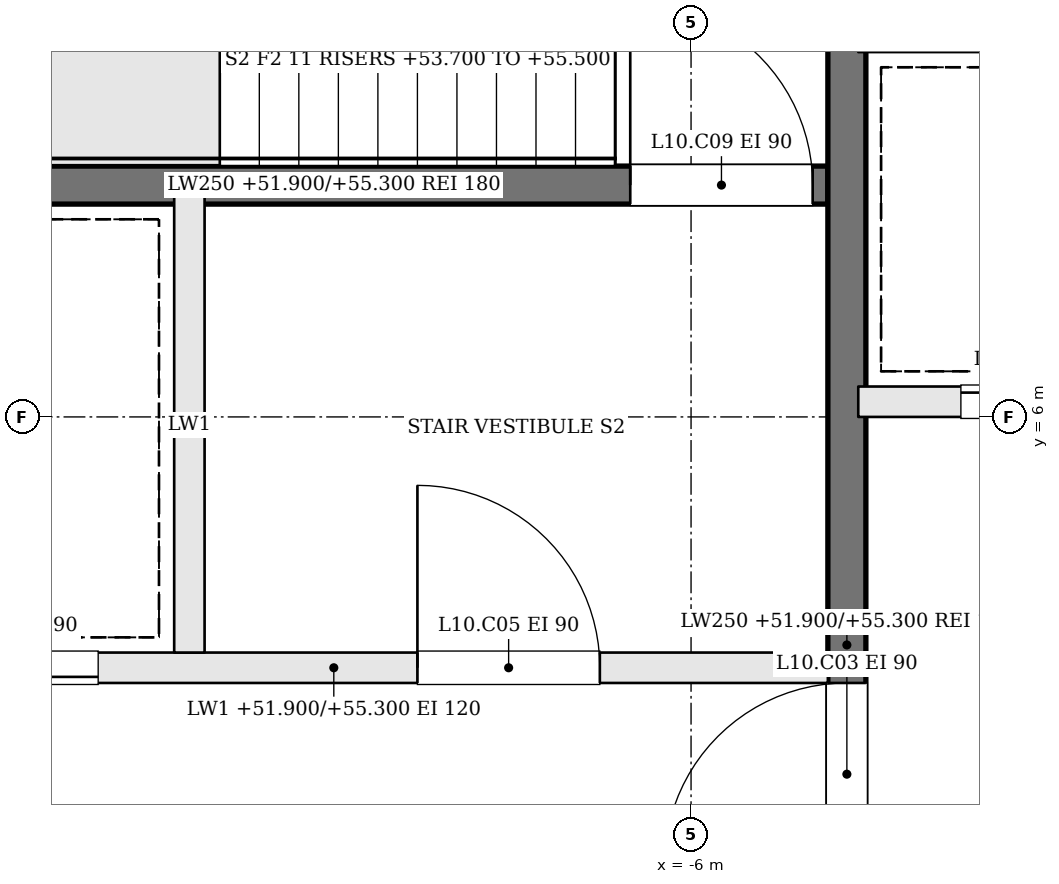
"""IFC4 building model, lengths in metres.
Left out: names, types, materials, properties, quantities, classifications, styles, units other than length and angle.
Written with IfcOpenShell. Run it as: python <this file> out.ifc"""

import sys

from ifc_helpers import new_model, si_unit, direction, frame, frame_2d, origin, place, context, subcontext, project, spatial, rectangle, extrude, element, fill, save


model = new_model("IFC4")
c1 = context("Model", 3, precision=1e-05, world=origin(), true_north=direction((0.0, 1.0)))
c2 = subcontext(c1, "Body", "Model", "MODEL_VIEW")
j1 = project(units=[si_unit("LENGTHUNIT", "METRE"), si_unit("PLANEANGLEUNIT", "RADIAN")], contexts=[c1])
p1 = place(None, origin())
s1 = spatial("IfcSite", under=j1, at=p1, CompositionType="ELEMENT")
p2 = place(p1, origin())
s2 = spatial("IfcBuilding", under=s1, at=p2, CompositionType="ELEMENT")
p3 = place(p2, frame((0.0, 0.0, 51.9)))
s3 = spatial("IfcBuildingStorey", under=s2, at=p3, CompositionType="ELEMENT", Elevation=51.9)
p4 = place(p3, frame((-11.6, 4.35, 0.0), z_axis=(0.0, 0.0, 1.0), x_axis=(1.0, 0.0, 0.0)))
e1 = element("IfcWall", 1, at=p4, inside=s3, PredefinedType="SOLIDWALL", context=c2, shape_type="SweptSolid", body=[
    extrude(rectangle(XDim=6.5, YDim=0.2, at=frame_2d((3.25, 0.0))), origin(), (0.0, 0.0, 1.0), 3.4),
])
p5 = place(p4, frame((3.8, 0.0, 0.0)))
e2 = element("IfcOpeningElement", 2, at=p5, cuts=e1, PredefinedType="OPENING", context=c2, shape_type="SweptSolid", body=[
    extrude(rectangle(XDim=1.2, YDim=2.1, at=frame_2d((0.6, 1.05))), frame((0.0, 0.11, 0.0), z_axis=(0.0, -1.0, 0.0), x_axis=(1.0, 0.0, 0.0)), (0.0, 0.0, 1.0), 0.22),
])
p6 = place(p4, frame((0.5, 0.0, 0.0)))
e3 = element("IfcOpeningElement", 3, at=p6, cuts=e1, PredefinedType="OPENING", context=c2, shape_type="SweptSolid", body=[
    extrude(rectangle(XDim=1.2, YDim=2.1, at=frame_2d((0.6, 1.05))), frame((0.0, 0.11, 0.0), z_axis=(0.0, -1.0, 0.0), x_axis=(1.0, 0.0, 0.0)), (0.0, 0.0, 1.0), 0.22),
])
p7 = place(p3, frame((-11.6, 7.525, 0.0), z_axis=(0.0, 0.0, 1.0), x_axis=(1.0, 0.0, 0.0)))
e4 = element("IfcWall", 4, at=p7, inside=s3, PredefinedType="SOLIDWALL", context=c2, shape_type="SweptSolid", body=[
    extrude(rectangle(XDim=6.5, YDim=0.25, at=frame_2d((3.25, 0.0))), origin(), (0.0, 0.0, 1.0), 3.4),
])
p8 = place(p7, frame((5.2, 0.0, 0.0)))
e5 = element("IfcOpeningElement", 5, at=p8, cuts=e4, PredefinedType="OPENING", context=c2, shape_type="SweptSolid", body=[
    extrude(rectangle(XDim=1.2, YDim=2.1, at=frame_2d((0.6, 1.05))), frame((0.0, 0.135, 0.0), z_axis=(0.0, -1.0, 0.0), x_axis=(1.0, 0.0, 0.0)), (0.0, 0.0, 1.0), 0.27),
])
p9 = place(p3, frame((-9.3, 4.45, 0.0), z_axis=(0.0, 0.0, 1.0), x_axis=(0.0, 1.0, 0.0)))
e6 = element("IfcWall", 6, at=p9, inside=s3, PredefinedType="SOLIDWALL", context=c2, shape_type="SweptSolid", body=[
    extrude(rectangle(XDim=3.0, YDim=0.2, at=frame_2d((1.5, 0.0))), origin(), (0.0, 0.0, 1.0), 3.4),
])
p10 = place(p3, frame((-4.975, -1.6, 0.0), z_axis=(0.0, 0.0, 1.0), x_axis=(0.0, 1.0, 0.0)))
e7 = element("IfcWall", 7, at=p10, inside=s3, PredefinedType="SOLIDWALL", context=c2, shape_type="SweptSolid", body=[
    extrude(rectangle(XDim=12.2, YDim=0.25, at=frame_2d((6.1, 0.0))), origin(), (0.0, 0.0, 1.0), 3.4),
])
p11 = place(p10, frame((4.65, 0.0, 0.0)))
e8 = element("IfcOpeningElement", 8, at=p11, cuts=e7, PredefinedType="OPENING", context=c2, shape_type="SweptSolid", body=[
    extrude(rectangle(XDim=1.2, YDim=2.1, at=frame_2d((0.6, 1.05))), frame((0.0, 0.135, 0.0), z_axis=(0.0, -1.0, 0.0), x_axis=(1.0, 0.0, 0.0)), (0.0, 0.0, 1.0), 0.27),
])
p12 = place(p3, frame((-4.9, 6.1, 0.0), z_axis=(0.0, 0.0, 1.0), x_axis=(1.0, 0.0, 0.0)))
e9 = element("IfcWall", 9, at=p12, inside=s3, PredefinedType="SOLIDWALL", context=c2, shape_type="SweptSolid", body=[
    extrude(rectangle(XDim=9.8, YDim=0.2, at=frame_2d((4.9, 0.0))), origin(), (0.0, 0.0, 1.0), 3.4),
])
p13 = place(p12, frame((0.675, 0.0, 0.0)))
e10 = element("IfcOpeningElement", 10, at=p13, cuts=e9, PredefinedType="OPENING", context=c2, shape_type="SweptSolid", body=[
    extrude(rectangle(XDim=1.1, YDim=2.1, at=frame_2d((0.55, 1.05))), frame((0.0, 0.11, 0.0), z_axis=(0.0, -1.0, 0.0), x_axis=(1.0, 0.0, 0.0)), (0.0, 0.0, 1.0), 0.22),
])
p14 = place(p12, frame((3.125, 0.0, 0.0)))
e11 = element("IfcOpeningElement", 11, at=p14, cuts=e9, PredefinedType="OPENING", context=c2, shape_type="SweptSolid", body=[
    extrude(rectangle(XDim=1.1, YDim=2.1, at=frame_2d((0.55, 1.05))), frame((0.0, 0.11, 0.0), z_axis=(0.0, -1.0, 0.0), x_axis=(1.0, 0.0, 0.0)), (0.0, 0.0, 1.0), 0.22),
])
p15 = place(p12, frame((5.575, 0.0, 0.0)))
e12 = element("IfcOpeningElement", 12, at=p15, cuts=e9, PredefinedType="OPENING", context=c2, shape_type="SweptSolid", body=[
    extrude(rectangle(XDim=1.1, YDim=2.1, at=frame_2d((0.55, 1.05))), frame((0.0, 0.11, 0.0), z_axis=(0.0, -1.0, 0.0), x_axis=(1.0, 0.0, 0.0)), (0.0, 0.0, 1.0), 0.22),
])
p16 = place(p12, frame((8.025, 0.0, 0.0)))
e13 = element("IfcOpeningElement", 13, at=p16, cuts=e9, PredefinedType="OPENING", context=c2, shape_type="SweptSolid", body=[
    extrude(rectangle(XDim=1.1, YDim=2.1, at=frame_2d((0.55, 1.05))), frame((0.0, 0.11, 0.0), z_axis=(0.0, -1.0, 0.0), x_axis=(1.0, 0.0, 0.0)), (0.0, 0.0, 1.0), 0.22),
])
p17 = place(p11, origin())
e14 = element("IfcDoor", 14, at=p17, inside=s3, OperationType="SINGLE_SWING_LEFT", PredefinedType="DOOR", context=c2, shape_type="SweptSolid", body=[
    extrude(rectangle(XDim=1.2, YDim=2.1, at=frame_2d((0.6, 1.05))), frame((0.0, 0.025, 0.0), z_axis=(0.0, -1.0, 0.0), x_axis=(1.0, 0.0, 0.0)), (0.0, 0.0, 1.0), 0.05),
])
fill(e8, e14)
p18 = place(p5, origin())
e15 = element("IfcDoor", 15, at=p18, inside=s3, OperationType="SINGLE_SWING_LEFT", PredefinedType="DOOR", context=c2, shape_type="SweptSolid", body=[
    extrude(rectangle(XDim=1.2, YDim=2.1, at=frame_2d((0.6, 1.05))), frame((0.0, 0.025, 0.0), z_axis=(0.0, -1.0, 0.0), x_axis=(1.0, 0.0, 0.0)), (0.0, 0.0, 1.0), 0.05),
])
fill(e2, e15)
p19 = place(p8, origin())
e16 = element("IfcDoor", 16, at=p19, inside=s3, OperationType="SINGLE_SWING_LEFT", PredefinedType="DOOR", context=c2, shape_type="SweptSolid", body=[
    extrude(rectangle(XDim=1.2, YDim=2.1, at=frame_2d((0.6, 1.05))), frame((0.0, 0.025, 0.0), z_axis=(0.0, -1.0, 0.0), x_axis=(1.0, 0.0, 0.0)), (0.0, 0.0, 1.0), 0.05),
])
fill(e5, e16)
p20 = place(p6, origin())
e17 = element("IfcDoor", 17, at=p20, inside=s3, OperationType="SLIDING_TO_RIGHT", PredefinedType="DOOR", context=c2, shape_type="SweptSolid", body=[
    extrude(rectangle(XDim=1.2, YDim=2.1, at=frame_2d((0.6, 1.05))), frame((0.0, 0.025, 0.0), z_axis=(0.0, -1.0, 0.0), x_axis=(1.0, 0.0, 0.0)), (0.0, 0.0, 1.0), 0.05),
])
fill(e3, e17)
p21 = place(p13, origin())
e18 = element("IfcDoor", 18, at=p21, inside=s3, OperationType="SLIDING_TO_RIGHT", PredefinedType="DOOR", context=c2, shape_type="SweptSolid", body=[
    extrude(rectangle(XDim=1.1, YDim=2.1, at=frame_2d((0.55, 1.05))), frame((0.0, 0.025, 0.0), z_axis=(0.0, -1.0, 0.0), x_axis=(1.0, 0.0, 0.0)), (0.0, 0.0, 1.0), 0.05),
])
fill(e10, e18)
save(model, sys.argv[1])
